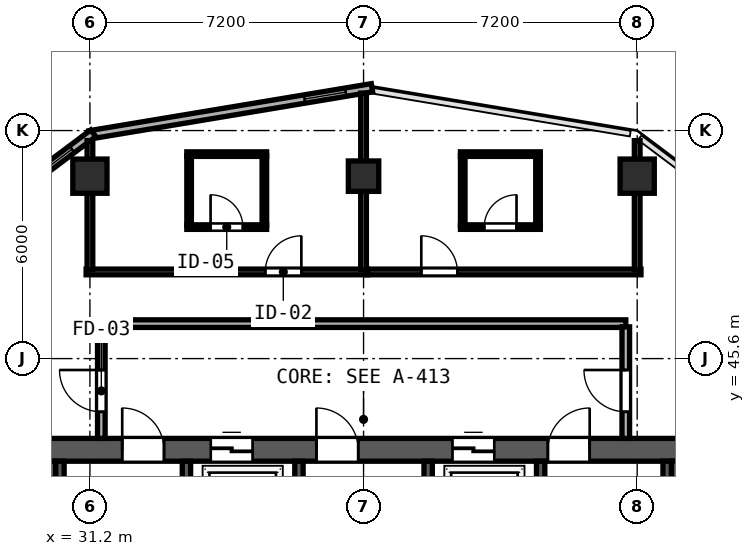
"""IFC4 building model, lengths in metres.
Left out: names, types, materials, properties, quantities, classifications, styles, units other than length and angle.
Written with IfcOpenShell. Run it as: python <this file> out.ifc"""

import sys

from ifc_helpers import new_model, si_unit, direction, frame, frame_2d, origin, origin_2d, place, context, subcontext, project, spatial, rectangle, hollow_rectangle, extrude, element, fill, save


model = new_model("IFC4")
c1 = context("Model", 3, precision=1e-05, world=origin(), true_north=direction((0.0, 1.0)))
c2 = subcontext(c1, "Body", "Model", "MODEL_VIEW")
j1 = project(units=[si_unit("LENGTHUNIT", "METRE"), si_unit("PLANEANGLEUNIT", "RADIAN")], contexts=[c1])
p1 = place(None, origin())
s1 = spatial("IfcSite", under=j1, at=p1, CompositionType="ELEMENT")
p2 = place(p1, origin())
s2 = spatial("IfcBuilding", under=s1, at=p2, CompositionType="ELEMENT")
p3 = place(p2, frame((0.0, 0.0, 191.8)))
s3 = spatial("IfcBuildingStorey", under=s2, at=p3, CompositionType="ELEMENT", Elevation=191.8)
p4 = place(p3, frame((29.7, 43.2, 0.0), z_axis=(0.0, 0.0, 1.0), x_axis=(1.0, 0.0, 0.0)))
e1 = element("IfcWall", 1, at=p4, inside=s3, PredefinedType="SHEAR", context=c2, shape_type="SweptSolid", body=[
    extrude(rectangle(XDim=17.4, YDim=0.6, at=frame_2d((8.7, 0.0))), origin(), (0.0, 0.0, 1.0), 3.62),
])
p5 = place(p4, frame((2.35, 0.0, 0.0)))
e2 = element("IfcOpeningElement", 2, at=p5, cuts=e1, PredefinedType="OPENING", context=c2, shape_type="SweptSolid", body=[
    extrude(rectangle(XDim=1.1, YDim=2.15, at=frame_2d((0.55, 1.075))), frame((0.0, 0.31, 0.0), z_axis=(0.0, -1.0, 0.0), x_axis=(1.0, 0.0, 0.0)), (0.0, 0.0, 1.0), 0.62),
])
p6 = place(p4, frame((7.46, 0.0, 0.0)))
e3 = element("IfcOpeningElement", 3, at=p6, cuts=e1, PredefinedType="OPENING", context=c2, shape_type="SweptSolid", body=[
    extrude(rectangle(XDim=1.1, YDim=2.15, at=frame_2d((0.55, 1.075))), frame((0.0, 0.31, 0.0), z_axis=(0.0, -1.0, 0.0), x_axis=(1.0, 0.0, 0.0)), (0.0, 0.0, 1.0), 0.62),
])
p7 = place(p4, frame((13.55, 0.0, 0.0)))
e4 = element("IfcOpeningElement", 4, at=p7, cuts=e1, PredefinedType="OPENING", context=c2, shape_type="SweptSolid", body=[
    extrude(rectangle(XDim=1.1, YDim=2.15, at=frame_2d((0.55, 1.075))), frame((0.0, 0.31, 0.0), z_axis=(0.0, -1.0, 0.0), x_axis=(1.0, 0.0, 0.0)), (0.0, 0.0, 1.0), 0.62),
])
p8 = place(p4, frame((4.68, 0.0, 0.0)))
e5 = element("IfcOpeningElement", 5, at=p8, cuts=e1, PredefinedType="OPENING", context=c2, shape_type="SweptSolid", body=[
    extrude(rectangle(XDim=1.1, YDim=2.2, at=frame_2d((0.55, 1.1))), frame((0.0, 0.31, 0.0), z_axis=(0.0, -1.0, 0.0), x_axis=(1.0, 0.0, 0.0)), (0.0, 0.0, 1.0), 0.62),
])
p9 = place(p4, frame((11.04, 0.0, 0.0)))
e6 = element("IfcOpeningElement", 6, at=p9, cuts=e1, PredefinedType="OPENING", context=c2, shape_type="SweptSolid", body=[
    extrude(rectangle(XDim=1.1, YDim=2.2, at=frame_2d((0.55, 1.1))), frame((0.0, 0.31, 0.0), z_axis=(0.0, -1.0, 0.0), x_axis=(1.0, 0.0, 0.0)), (0.0, 0.0, 1.0), 0.62),
])
for number, where, z_axis, x_axis in (
    (7, (30.0, 32.8, 0.0), (0.0, 0.0, 1.0), (0.0, 1.0, 0.0)),
    (8, (46.8, 32.8, 0.0), (0.0, 0.0, 1.0), (0.0, 1.0, 0.0)),
):
    element("IfcWall", number, at=place(p3, frame(where, z_axis=z_axis, x_axis=x_axis)), inside=s3, PredefinedType="SHEAR", context=c2, shape_type="SweptSolid", body=[
        extrude(rectangle(XDim=10.1, YDim=0.6, at=frame_2d((5.05, 0.0))), origin(), (0.0, 0.0, 1.0), 3.62),
    ])
for number, where, z_axis, x_axis in (
    (9, (30.412, 35.39, 0.0), (0.0, 0.0, 1.0), (0.0, 1.0, 0.0)),
    (10, (33.74, 35.39, 0.0), (0.0, 0.0, 1.0), (0.0, 1.0, 0.0)),
    (11, (36.7, 35.39, 0.0), (0.0, 0.0, 1.0), (0.0, 1.0, 0.0)),
    (12, (40.1, 35.39, 0.0), (0.0, 0.0, 1.0), (0.0, 1.0, 0.0)),
    (13, (43.06, 35.39, 0.0), (0.0, 0.0, 1.0), (0.0, 1.0, 0.0)),
    (14, (46.388, 35.39, 0.0), (0.0, 0.0, 1.0), (0.0, 1.0, 0.0)),
):
    element("IfcWall", number, at=place(p3, frame(where, z_axis=z_axis, x_axis=x_axis)), inside=s3, PredefinedType="SHEAR", context=c2, shape_type="SweptSolid", body=[
        extrude(rectangle(XDim=7.51, YDim=0.22, at=frame_2d((3.755, 0.0))), origin(), (0.0, 0.0, 1.0), 3.62),
    ])
for number, where, z_axis, x_axis in (
    (15, (31.2, 50.4, 0.0), (0.0, 0.0, 1.0), (1.0, 0.0, 0.0)),
    (16, (45.6, 50.4, 0.0), (0.0, 0.0, 1.0), (1.0, 0.0, 0.0)),
):
    element("IfcColumn", number, at=place(p3, frame(where, z_axis=z_axis, x_axis=x_axis)), inside=s3, PredefinedType="COLUMN", context=c2, shape_type="SweptSolid", body=[
        extrude(hollow_rectangle(XDim=0.9, YDim=0.9, WallThickness=0.034, at=origin_2d()), origin(), (0.0, 0.0, 1.0), 3.8),
    ])
p10 = place(p3, frame((38.4, 50.4, 0.0), z_axis=(0.0, 0.0, 1.0), x_axis=(1.0, 0.0, 0.0)))
e17 = element("IfcColumn", 17, at=p10, inside=s3, PredefinedType="COLUMN", context=c2, shape_type="SweptSolid", body=[
    extrude(hollow_rectangle(XDim=0.8, YDim=0.8, WallThickness=0.03, at=origin_2d()), origin(), (0.0, 0.0, 1.0), 3.8),
])
p11 = place(p3, frame((38.622, 52.726, 0.0), z_axis=(0.0, 0.0, 1.0), x_axis=(-0.986390420428, -0.164420006349, 0.0)))
e18 = element("IfcWall", 18, at=p11, inside=s3, PredefinedType="SOLIDWALL", context=c2, shape_type="SweptSolid", body=[
    extrude(rectangle(XDim=7.534, YDim=0.22, at=frame_2d((3.767, 0.0))), origin(), (0.0, 0.0, 1.0), 3.62),
])
p12 = place(p11, frame((0.7, 0.0, 0.85)))
e19 = element("IfcOpeningElement", 19, at=p12, cuts=e18, PredefinedType="OPENING", context=c2, shape_type="SweptSolid", body=[
    extrude(rectangle(XDim=1.1, YDim=1.75, at=frame_2d((0.55, 0.875))), frame((0.0, 0.12, 0.0), z_axis=(0.0, -1.0, 0.0), x_axis=(1.0, 0.0, 0.0)), (0.0, 0.0, 1.0), 0.24),
])
p13 = place(p3, frame((31.289, 51.529, 0.0), z_axis=(0.0, 0.0, 1.0), x_axis=(-0.800014580093, -0.599980559383, 0.0)))
e20 = element("IfcWall", 20, at=p13, inside=s3, PredefinedType="SOLIDWALL", context=c2, shape_type="SweptSolid", body=[
    extrude(rectangle(XDim=6.028, YDim=0.22, at=frame_2d((3.014, 0.0))), origin(), (0.0, 0.0, 1.0), 3.62),
])
p14 = place(p13, frame((0.7, 0.0, 0.85)))
e21 = element("IfcOpeningElement", 21, at=p14, cuts=e20, PredefinedType="OPENING", context=c2, shape_type="SweptSolid", body=[
    extrude(rectangle(XDim=1.1, YDim=1.75, at=frame_2d((0.55, 0.875))), frame((0.0, 0.12, 0.0), z_axis=(0.0, -1.0, 0.0), x_axis=(1.0, 0.0, 0.0)), (0.0, 0.0, 1.0), 0.24),
])
p15 = place(p3, frame((31.5, 46.52, 0.0), z_axis=(0.0, 0.0, 1.0), x_axis=(1.0, 0.0, 0.0)))
e22 = element("IfcWall", 22, at=p15, inside=s3, PredefinedType="SOLIDWALL", context=c2, shape_type="SweptSolid", body=[
    extrude(rectangle(XDim=13.8, YDim=0.2, at=frame_2d((6.9, 0.0))), origin(), (0.0, 0.0, 1.0), 3.62),
])
p16 = place(p3, frame((31.5, 43.5, 0.0), z_axis=(0.0, 0.0, 1.0), x_axis=(0.0, 1.0, 0.0)))
e23 = element("IfcWall", 23, at=p16, inside=s3, PredefinedType="SOLIDWALL", context=c2, shape_type="SweptSolid", body=[
    extrude(rectangle(XDim=2.935, YDim=0.2, at=frame_2d((1.468, 0.0))), origin(), (0.0, 0.0, 1.0), 3.62),
])
p17 = place(p16, frame((1.8, 0.0, 0.0), z_axis=(0.0, 0.0, 1.0), x_axis=(-1.0, 0.0, 0.0)))
e24 = element("IfcOpeningElement", 24, at=p17, cuts=e23, PredefinedType="OPENING", context=c2, shape_type="SweptSolid", body=[
    extrude(rectangle(XDim=1.1, YDim=2.15, at=frame_2d((0.55, 1.075))), frame((0.0, 0.11, 0.0), z_axis=(0.0, -1.0, 0.0), x_axis=(1.0, 0.0, 0.0)), (0.0, 0.0, 1.0), 0.22),
])
p18 = place(p3, frame((45.3, 43.5, 0.0), z_axis=(0.0, 0.0, 1.0), x_axis=(0.0, 1.0, 0.0)))
e25 = element("IfcWall", 25, at=p18, inside=s3, PredefinedType="SOLIDWALL", context=c2, shape_type="SweptSolid", body=[
    extrude(rectangle(XDim=2.935, YDim=0.2, at=frame_2d((1.468, 0.0))), origin(), (0.0, 0.0, 1.0), 3.62),
])
p19 = place(p18, frame((0.7, 0.0, 0.0)))
e26 = element("IfcOpeningElement", 26, at=p19, cuts=e25, PredefinedType="OPENING", context=c2, shape_type="SweptSolid", body=[
    extrude(rectangle(XDim=1.1, YDim=2.15, at=frame_2d((0.55, 1.075))), frame((0.0, 0.11, 0.0), z_axis=(0.0, -1.0, 0.0), x_axis=(1.0, 0.0, 0.0)), (0.0, 0.0, 1.0), 0.22),
])
p20 = place(p3, frame((31.1, 47.88, 0.0), z_axis=(0.0, 0.0, 1.0), x_axis=(1.0, 0.0, 0.0)))
e27 = element("IfcWall", 27, at=p20, inside=s3, PredefinedType="PARTITIONING", context=c2, shape_type="SweptSolid", body=[
    extrude(rectangle(XDim=7.4, YDim=0.15, at=frame_2d((3.7, 0.0))), origin(), (0.0, 0.0, 1.0), 3.62),
])
p21 = place(p20, frame((4.714, 0.0, 0.0)))
e28 = element("IfcOpeningElement", 28, at=p21, cuts=e27, PredefinedType="OPENING", context=c2, shape_type="SweptSolid", body=[
    extrude(rectangle(XDim=0.95, YDim=2.15, at=frame_2d((0.475, 1.075))), frame((0.0, 0.085, 0.0), z_axis=(0.0, -1.0, 0.0), x_axis=(1.0, 0.0, 0.0)), (0.0, 0.0, 1.0), 0.17),
])
p22 = place(p3, frame((31.2, 47.94, 0.0), z_axis=(0.0, 0.0, 1.0), x_axis=(0.0, 1.0, 0.0)))
e29 = element("IfcWall", 29, at=p22, inside=s3, PredefinedType="PARTITIONING", context=c2, shape_type="SweptSolid", body=[
    extrude(rectangle(XDim=3.395, YDim=0.15, at=frame_2d((1.698, 0.0))), origin(), (0.0, 0.0, 1.0), 3.105),
])
p23 = place(p3, frame((38.4, 47.94, 0.0), z_axis=(0.0, 0.0, 1.0), x_axis=(0.0, 1.0, 0.0)))
e30 = element("IfcWall", 30, at=p23, inside=s3, PredefinedType="PARTITIONING", context=c2, shape_type="SweptSolid", body=[
    extrude(rectangle(XDim=4.645, YDim=0.15, at=frame_2d((2.323, 0.0))), origin(), (0.0, 0.0, 1.0), 3.62),
])
p24 = place(p3, frame((33.75, 50.98, 0.0), z_axis=(0.0, 0.0, 1.0), x_axis=(1.0, 0.0, 0.0)))
e31 = element("IfcWall", 31, at=p24, inside=s3, PredefinedType="PARTITIONING", context=c2, shape_type="SweptSolid", body=[
    extrude(rectangle(XDim=2.1, YDim=0.12, at=frame_2d((1.05, 0.0))), origin(), (0.0, 0.0, 1.0), 3.62),
])
p25 = place(p3, frame((33.75, 49.06, 0.0), z_axis=(0.0, 0.0, 1.0), x_axis=(1.0, 0.0, 0.0)))
e32 = element("IfcWall", 32, at=p25, inside=s3, PredefinedType="PARTITIONING", context=c2, shape_type="SweptSolid", body=[
    extrude(rectangle(XDim=2.1, YDim=0.12, at=frame_2d((1.05, 0.0))), origin(), (0.0, 0.0, 1.0), 3.62),
])
p26 = place(p25, frame((0.625, 0.0, 0.0)))
e33 = element("IfcOpeningElement", 33, at=p26, cuts=e32, PredefinedType="OPENING", context=c2, shape_type="SweptSolid", body=[
    extrude(rectangle(XDim=0.85, YDim=2.1, at=frame_2d((0.425, 1.05))), frame((0.0, 0.07, 0.0), z_axis=(0.0, -1.0, 0.0), x_axis=(1.0, 0.0, 0.0)), (0.0, 0.0, 1.0), 0.14),
])
for number, where, z_axis, x_axis in (
    (34, (33.81, 49.105, 0.0), (0.0, 0.0, 1.0), (0.0, 1.0, 0.0)),
    (35, (35.79, 49.105, 0.0), (0.0, 0.0, 1.0), (0.0, 1.0, 0.0)),
):
    element("IfcWall", number, at=place(p3, frame(where, z_axis=z_axis, x_axis=x_axis)), inside=s3, PredefinedType="PARTITIONING", context=c2, shape_type="SweptSolid", body=[
        extrude(rectangle(XDim=1.83, YDim=0.12, at=frame_2d((0.915, 0.0))), origin(), (0.0, 0.0, 1.0), 3.62),
    ])
p27 = place(p3, frame((38.502, 47.88, 0.0), z_axis=(0.0, 0.0, 1.0), x_axis=(1.0, 0.0, 0.0)))
e36 = element("IfcWall", 36, at=p27, inside=s3, PredefinedType="PARTITIONING", context=c2, shape_type="SweptSolid", body=[
    extrude(rectangle(XDim=7.198, YDim=0.15, at=frame_2d((3.599, 0.0))), origin(), (0.0, 0.0, 1.0), 3.62),
])
p28 = place(p27, frame((1.417, 0.0, 0.0)))
e37 = element("IfcOpeningElement", 37, at=p28, cuts=e36, PredefinedType="OPENING", context=c2, shape_type="SweptSolid", body=[
    extrude(rectangle(XDim=0.95, YDim=2.15, at=frame_2d((0.475, 1.075))), frame((0.0, 0.085, 0.0), z_axis=(0.0, -1.0, 0.0), x_axis=(1.0, 0.0, 0.0)), (0.0, 0.0, 1.0), 0.17),
])
p29 = place(p3, frame((45.6, 47.94, 0.0), z_axis=(0.0, 0.0, 1.0), x_axis=(0.0, 1.0, 0.0)))
e38 = element("IfcWall", 38, at=p29, inside=s3, PredefinedType="PARTITIONING", context=c2, shape_type="SweptSolid", body=[
    extrude(rectangle(XDim=3.395, YDim=0.15, at=frame_2d((1.698, 0.0))), origin(), (0.0, 0.0, 1.0), 3.105),
])
p30 = place(p3, frame((40.95, 50.98, 0.0), z_axis=(0.0, 0.0, 1.0), x_axis=(1.0, 0.0, 0.0)))
e39 = element("IfcWall", 39, at=p30, inside=s3, PredefinedType="PARTITIONING", context=c2, shape_type="SweptSolid", body=[
    extrude(rectangle(XDim=2.1, YDim=0.12, at=frame_2d((1.05, 0.0))), origin(), (0.0, 0.0, 1.0), 3.62),
])
p31 = place(p3, frame((40.95, 49.06, 0.0), z_axis=(0.0, 0.0, 1.0), x_axis=(1.0, 0.0, 0.0)))
e40 = element("IfcWall", 40, at=p31, inside=s3, PredefinedType="PARTITIONING", context=c2, shape_type="SweptSolid", body=[
    extrude(rectangle(XDim=2.1, YDim=0.12, at=frame_2d((1.05, 0.0))), origin(), (0.0, 0.0, 1.0), 3.62),
])
p32 = place(p31, frame((0.625, 0.0, 0.0)))
e41 = element("IfcOpeningElement", 41, at=p32, cuts=e40, PredefinedType="OPENING", context=c2, shape_type="SweptSolid", body=[
    extrude(rectangle(XDim=0.85, YDim=2.1, at=frame_2d((0.425, 1.05))), frame((0.0, 0.07, 0.0), z_axis=(0.0, -1.0, 0.0), x_axis=(1.0, 0.0, 0.0)), (0.0, 0.0, 1.0), 0.14),
])
for number, where, z_axis, x_axis in (
    (42, (41.01, 49.105, 0.0), (0.0, 0.0, 1.0), (0.0, 1.0, 0.0)),
    (43, (42.99, 49.105, 0.0), (0.0, 0.0, 1.0), (0.0, 1.0, 0.0)),
):
    element("IfcWall", number, at=place(p3, frame(where, z_axis=z_axis, x_axis=x_axis)), inside=s3, PredefinedType="PARTITIONING", context=c2, shape_type="SweptSolid", body=[
        extrude(rectangle(XDim=1.83, YDim=0.12, at=frame_2d((0.915, 0.0))), origin(), (0.0, 0.0, 1.0), 3.62),
    ])
p33 = place(p12, origin())
e44 = element("IfcWindow", 44, at=p33, inside=s3, PartitioningType="SINGLE_PANEL", PredefinedType="WINDOW", context=c2, shape_type="SweptSolid", body=[
    extrude(rectangle(XDim=1.1, YDim=1.75, at=frame_2d((0.55, 0.875))), frame((0.0, 0.03, 0.0), z_axis=(0.0, -1.0, 0.0), x_axis=(1.0, 0.0, 0.0)), (0.0, 0.0, 1.0), 0.06),
])
fill(e19, e44)
p34 = place(p14, origin())
e45 = element("IfcWindow", 45, at=p34, inside=s3, PartitioningType="SINGLE_PANEL", PredefinedType="WINDOW", context=c2, shape_type="SweptSolid", body=[
    extrude(rectangle(XDim=1.1, YDim=1.75, at=frame_2d((0.55, 0.875))), frame((0.0, 0.03, 0.0), z_axis=(0.0, -1.0, 0.0), x_axis=(1.0, 0.0, 0.0)), (0.0, 0.0, 1.0), 0.06),
])
fill(e21, e45)
p35 = place(p5, origin())
e46 = element("IfcDoor", 46, at=p35, inside=s3, OperationType="SINGLE_SWING_LEFT", PredefinedType="DOOR", context=c2, shape_type="SweptSolid", body=[
    extrude(rectangle(XDim=1.1, YDim=2.15, at=frame_2d((0.55, 1.075))), frame((0.0, 0.185, 0.0), z_axis=(0.0, -1.0, 0.0), x_axis=(1.0, 0.0, 0.0)), (0.0, 0.0, 1.0), 0.05),
])
fill(e2, e46)
p36 = place(p6, origin())
e47 = element("IfcDoor", 47, at=p36, inside=s3, OperationType="SINGLE_SWING_LEFT", PredefinedType="DOOR", context=c2, shape_type="SweptSolid", body=[
    extrude(rectangle(XDim=1.1, YDim=2.15, at=frame_2d((0.55, 1.075))), frame((0.0, 0.185, 0.0), z_axis=(0.0, -1.0, 0.0), x_axis=(1.0, 0.0, 0.0)), (0.0, 0.0, 1.0), 0.05),
])
fill(e3, e47)
p37 = place(p7, origin())
e48 = element("IfcDoor", 48, at=p37, inside=s3, OperationType="SINGLE_SWING_RIGHT", PredefinedType="DOOR", context=c2, shape_type="SweptSolid", body=[
    extrude(rectangle(XDim=1.1, YDim=2.15, at=frame_2d((0.55, 1.075))), frame((0.0, 0.185, 0.0), z_axis=(0.0, -1.0, 0.0), x_axis=(1.0, 0.0, 0.0)), (0.0, 0.0, 1.0), 0.05),
])
fill(e4, e48)
p38 = place(p17, origin())
e49 = element("IfcDoor", 49, at=p38, inside=s3, OperationType="SINGLE_SWING_LEFT", PredefinedType="DOOR", context=c2, shape_type="SweptSolid", body=[
    extrude(rectangle(XDim=1.1, YDim=2.15, at=frame_2d((0.55, 1.075))), frame((0.0, 0.025, 0.0), z_axis=(0.0, -1.0, 0.0), x_axis=(1.0, 0.0, 0.0)), (0.0, 0.0, 1.0), 0.05),
])
fill(e24, e49)
p39 = place(p19, origin())
e50 = element("IfcDoor", 50, at=p39, inside=s3, OperationType="SINGLE_SWING_RIGHT", PredefinedType="DOOR", context=c2, shape_type="SweptSolid", body=[
    extrude(rectangle(XDim=1.1, YDim=2.15, at=frame_2d((0.55, 1.075))), frame((0.0, 0.025, 0.0), z_axis=(0.0, -1.0, 0.0), x_axis=(1.0, 0.0, 0.0)), (0.0, 0.0, 1.0), 0.05),
])
fill(e26, e50)
p40 = place(p8, origin())
e51 = element("IfcDoor", 51, at=p40, inside=s3, OperationType="SLIDING_TO_LEFT", PredefinedType="DOOR", context=c2, shape_type="SweptSolid", body=[
    extrude(rectangle(XDim=1.1, YDim=2.2, at=frame_2d((0.55, 1.1))), frame((0.0, 0.185, 0.0), z_axis=(0.0, -1.0, 0.0), x_axis=(1.0, 0.0, 0.0)), (0.0, 0.0, 1.0), 0.05),
])
fill(e5, e51)
p41 = place(p9, origin())
e52 = element("IfcDoor", 52, at=p41, inside=s3, OperationType="SLIDING_TO_LEFT", PredefinedType="DOOR", context=c2, shape_type="SweptSolid", body=[
    extrude(rectangle(XDim=1.1, YDim=2.2, at=frame_2d((0.55, 1.1))), frame((0.0, 0.185, 0.0), z_axis=(0.0, -1.0, 0.0), x_axis=(1.0, 0.0, 0.0)), (0.0, 0.0, 1.0), 0.05),
])
fill(e6, e52)
p42 = place(p21, origin())
e53 = element("IfcDoor", 53, at=p42, inside=s3, OperationType="SINGLE_SWING_RIGHT", PredefinedType="DOOR", context=c2, shape_type="SweptSolid", body=[
    extrude(rectangle(XDim=0.95, YDim=2.15, at=frame_2d((0.475, 1.075))), frame((0.0, 0.025, 0.0), z_axis=(0.0, -1.0, 0.0), x_axis=(1.0, 0.0, 0.0)), (0.0, 0.0, 1.0), 0.05),
])
fill(e28, e53)
p43 = place(p26, origin())
e54 = element("IfcDoor", 54, at=p43, inside=s3, OperationType="SINGLE_SWING_LEFT", PredefinedType="DOOR", context=c2, shape_type="SweptSolid", body=[
    extrude(rectangle(XDim=0.85, YDim=2.1, at=frame_2d((0.425, 1.05))), frame((0.0, 0.025, 0.0), z_axis=(0.0, -1.0, 0.0), x_axis=(1.0, 0.0, 0.0)), (0.0, 0.0, 1.0), 0.05),
])
fill(e33, e54)
p44 = place(p28, origin())
e55 = element("IfcDoor", 55, at=p44, inside=s3, OperationType="SINGLE_SWING_LEFT", PredefinedType="DOOR", context=c2, shape_type="SweptSolid", body=[
    extrude(rectangle(XDim=0.95, YDim=2.15, at=frame_2d((0.475, 1.075))), frame((0.0, 0.025, 0.0), z_axis=(0.0, -1.0, 0.0), x_axis=(1.0, 0.0, 0.0)), (0.0, 0.0, 1.0), 0.05),
])
fill(e37, e55)
p45 = place(p32, origin())
e56 = element("IfcDoor", 56, at=p45, inside=s3, OperationType="SINGLE_SWING_RIGHT", PredefinedType="DOOR", context=c2, shape_type="SweptSolid", body=[
    extrude(rectangle(XDim=0.85, YDim=2.1, at=frame_2d((0.425, 1.05))), frame((0.0, 0.025, 0.0), z_axis=(0.0, -1.0, 0.0), x_axis=(1.0, 0.0, 0.0)), (0.0, 0.0, 1.0), 0.05),
])
fill(e41, e56)
save(model, sys.argv[1])
